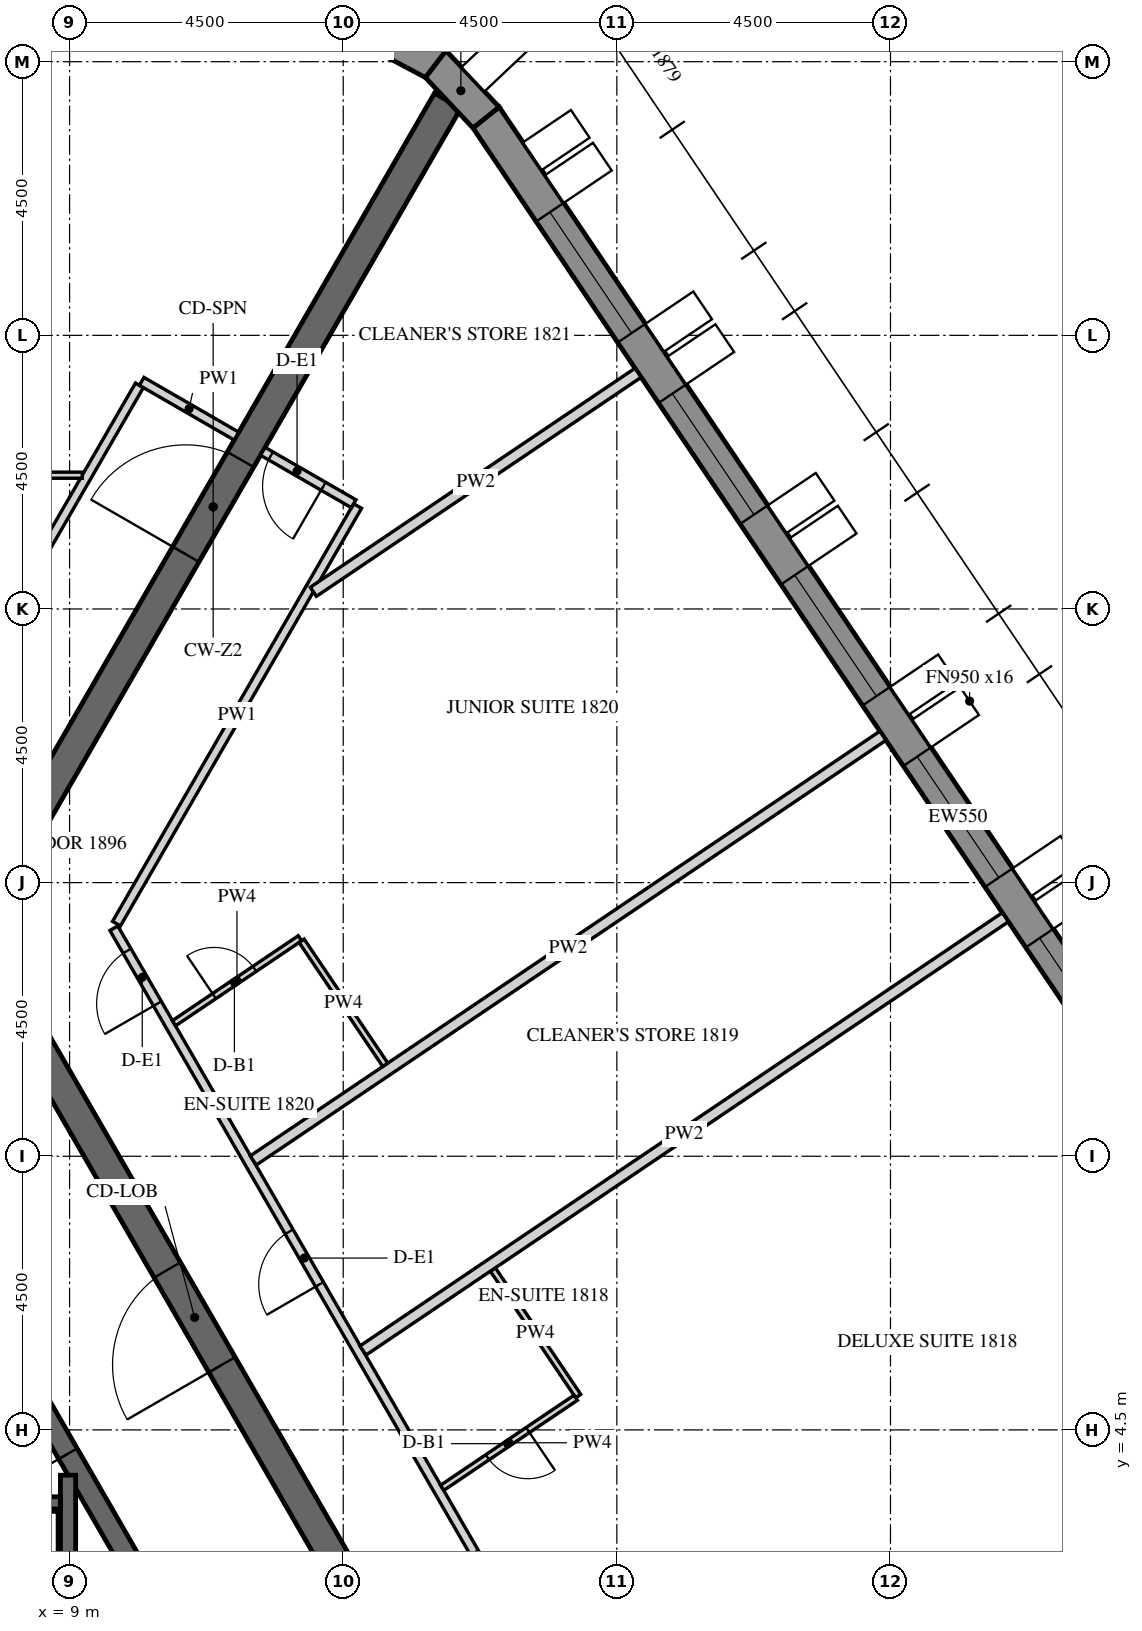
"""IFC4 building model, lengths in metres.
Left out: names, types, materials, properties, quantities, classifications, styles, units other than length and angle.
Written with IfcOpenShell. Run it as: python <this file> out.ifc"""

import sys

from ifc_helpers import new_model, si_unit, direction, frame, frame_2d, origin, place, context, subcontext, project, spatial, polyline, rectangle, outline, extrude, element, fill, save


model = new_model("IFC4")
c1 = context("Model", 3, precision=1e-05, world=origin(), true_north=direction((0.0, 1.0)))
c2 = subcontext(c1, "Body", "Model", "MODEL_VIEW")
j1 = project(units=[si_unit("LENGTHUNIT", "METRE"), si_unit("PLANEANGLEUNIT", "RADIAN")], contexts=[c1])
p1 = place(None, origin())
s1 = spatial("IfcSite", under=j1, at=p1, CompositionType="ELEMENT")
p2 = place(p1, origin())
s2 = spatial("IfcBuilding", under=s1, at=p2, CompositionType="ELEMENT")
p3 = place(p2, frame((0.0, 0.0, 226.8)))
s3 = spatial("IfcBuildingStorey", under=s2, at=p3, CompositionType="ELEMENT", Elevation=226.8)
p4 = place(p3, frame((31.371, 3.071, -0.15), z_axis=(0.0, 0.0, 1.0), x_axis=(-0.559189891278, 0.829039604297, 0.0)))
e1 = element("IfcWall", 1, at=p4, inside=s3, PredefinedType="SOLIDWALL", context=c2, shape_type="SweptSolid", body=[
    extrude(outline(polyline([(-0.026, -0.275), (27.781, -0.275), (27.736, 0.275), (0.026, 0.275), (-0.026, -0.275)])), origin(), (0.0, 0.0, 1.0), 3.9),
])
p5 = place(p4, frame((1.879, 0.0, 1.05)))
e2 = element("IfcOpeningElement", 2, at=p5, cuts=e1, PredefinedType="OPENING", context=c2, shape_type="SweptSolid", body=[
    extrude(rectangle(XDim=2.4, YDim=2.4, at=frame_2d((1.2, 1.2))), frame((0.0, 0.285, 0.0), z_axis=(0.0, -1.0, 0.0), x_axis=(1.0, 0.0, 0.0)), (0.0, 0.0, 1.0), 0.57),
])
p6 = place(p4, frame((5.479, 0.0, 1.05)))
e3 = element("IfcOpeningElement", 3, at=p6, cuts=e1, PredefinedType="OPENING", context=c2, shape_type="SweptSolid", body=[
    extrude(rectangle(XDim=2.4, YDim=2.4, at=frame_2d((1.2, 1.2))), frame((0.0, 0.285, 0.0), z_axis=(0.0, -1.0, 0.0), x_axis=(1.0, 0.0, 0.0)), (0.0, 0.0, 1.0), 0.57),
])
p7 = place(p4, frame((9.079, 0.0, 1.05)))
e4 = element("IfcOpeningElement", 4, at=p7, cuts=e1, PredefinedType="OPENING", context=c2, shape_type="SweptSolid", body=[
    extrude(rectangle(XDim=2.4, YDim=2.4, at=frame_2d((1.2, 1.2))), frame((0.0, 0.285, 0.0), z_axis=(0.0, -1.0, 0.0), x_axis=(1.0, 0.0, 0.0)), (0.0, 0.0, 1.0), 0.57),
])
p8 = place(p4, frame((12.679, 0.0, 1.05)))
e5 = element("IfcOpeningElement", 5, at=p8, cuts=e1, PredefinedType="OPENING", context=c2, shape_type="SweptSolid", body=[
    extrude(rectangle(XDim=2.4, YDim=2.4, at=frame_2d((1.2, 1.2))), frame((0.0, 0.285, 0.0), z_axis=(0.0, -1.0, 0.0), x_axis=(1.0, 0.0, 0.0)), (0.0, 0.0, 1.0), 0.57),
])
p9 = place(p4, frame((16.279, 0.0, 1.05)))
e6 = element("IfcOpeningElement", 6, at=p9, cuts=e1, PredefinedType="OPENING", context=c2, shape_type="SweptSolid", body=[
    extrude(rectangle(XDim=2.4, YDim=2.4, at=frame_2d((1.2, 1.2))), frame((0.0, 0.285, 0.0), z_axis=(0.0, -1.0, 0.0), x_axis=(1.0, 0.0, 0.0)), (0.0, 0.0, 1.0), 0.57),
])
p10 = place(p4, frame((19.879, 0.0, 1.05)))
e7 = element("IfcOpeningElement", 7, at=p10, cuts=e1, PredefinedType="OPENING", context=c2, shape_type="SweptSolid", body=[
    extrude(rectangle(XDim=2.4, YDim=2.4, at=frame_2d((1.2, 1.2))), frame((0.0, 0.285, 0.0), z_axis=(0.0, -1.0, 0.0), x_axis=(1.0, 0.0, 0.0)), (0.0, 0.0, 1.0), 0.57),
])
p11 = place(p4, frame((23.479, 0.0, 1.05)))
e8 = element("IfcOpeningElement", 8, at=p11, cuts=e1, PredefinedType="OPENING", context=c2, shape_type="SweptSolid", body=[
    extrude(rectangle(XDim=2.4, YDim=2.4, at=frame_2d((1.2, 1.2))), frame((0.0, 0.285, 0.0), z_axis=(0.0, -1.0, 0.0), x_axis=(1.0, 0.0, 0.0)), (0.0, 0.0, 1.0), 0.57),
])
p12 = place(p3, frame((15.849, 26.083, -0.15), z_axis=(0.0, 0.0, 1.0), x_axis=(-0.686196220404, 0.727416488061, 0.0)))
e9 = element("IfcWall", 9, at=p12, inside=s3, PredefinedType="SOLIDWALL", context=c2, shape_type="SweptSolid", body=[
    extrude(outline(polyline([(-0.022, -0.275), (1.253, -0.275), (1.163, 0.275), (0.022, 0.275), (-0.022, -0.275)])), origin(), (0.0, 0.0, 1.0), 3.9),
])
p13 = place(p3, frame((15.02, 26.962, -0.15), z_axis=(0.0, 0.0, 1.0), x_axis=(-0.882950818639, 0.469465495926, 0.0)))
e10 = element("IfcWall", 10, at=p13, inside=s3, PredefinedType="SOLIDWALL", context=c2, shape_type="SweptSolid", body=[
    extrude(outline(polyline([(-0.045, -0.275), (1.253, -0.275), (1.163, 0.275), (0.045, 0.275), (-0.045, -0.275)])), origin(), (0.0, 0.0, 1.0), 3.9),
])
p14 = place(p3, frame((14.722, 0.0, -0.15), z_axis=(0.0, 0.0, 1.0), x_axis=(-0.50000571537, 0.866022103989, 0.0)))
e11 = element("IfcWall", 11, at=p14, inside=s3, PredefinedType="SHEAR", context=c2, shape_type="SweptSolid", body=[
    extrude(outline(polyline([(-0.144, -0.25), (14.867, -0.25), (14.578, 0.25), (0.144, 0.25), (-0.144, -0.25)])), origin(), (0.0, 0.0, 1.0), 3.9),
])
p15 = place(p14, frame((6.432, 0.0, 0.15)))
e12 = element("IfcOpeningElement", 12, at=p15, cuts=e11, PredefinedType="OPENING", context=c2, shape_type="SweptSolid", body=[
    extrude(rectangle(XDim=1.8, YDim=2.4, at=frame_2d((0.9, 1.2))), frame((0.0, 0.26, 0.0), z_axis=(0.0, -1.0, 0.0), x_axis=(1.0, 0.0, 0.0)), (0.0, 0.0, 1.0), 0.52),
])
p16 = place(p3, frame((7.506, 13.0, -0.15), z_axis=(0.0, 0.0, 1.0), x_axis=(0.499988271576, 0.866032175087, 0.0)))
e13 = element("IfcWall", 13, at=p16, inside=s3, PredefinedType="SHEAR", context=c2, shape_type="SweptSolid", body=[
    extrude(rectangle(XDim=15.424, YDim=0.5, at=frame_2d((7.712, 0.0))), origin(), (0.0, 0.0, 1.0), 3.9),
])
p17 = place(p16, frame((6.812, 0.0, 0.15)))
e14 = element("IfcOpeningElement", 14, at=p17, cuts=e13, PredefinedType="OPENING", context=c2, shape_type="SweptSolid", body=[
    extrude(rectangle(XDim=1.8, YDim=2.4, at=frame_2d((0.9, 1.2))), frame((0.0, 0.26, 0.0), z_axis=(0.0, -1.0, 0.0), x_axis=(1.0, 0.0, 0.0)), (0.0, 0.0, 1.0), 0.52),
])
p18 = place(p3, frame((11.345, 0.0, -0.15), z_axis=(0.0, 0.0, 1.0), x_axis=(-0.499995046907, 0.866028263435, 0.0)))
e15 = element("IfcWall", 15, at=p18, inside=s3, PredefinedType="SHEAR", context=c2, shape_type="SweptSolid", body=[
    extrude(outline(polyline([(-0.101, -0.175), (11.446, -0.175), (11.244, 0.175), (0.101, 0.175), (-0.101, -0.175)])), origin(), (0.0, 0.0, 1.0), 3.9),
])
p19 = place(p18, frame((4.744, 0.0, 0.15)))
e16 = element("IfcOpeningElement", 16, at=p19, cuts=e15, PredefinedType="OPENING", context=c2, shape_type="SweptSolid", body=[
    extrude(rectangle(XDim=1.8, YDim=2.4, at=frame_2d((0.9, 1.2))), frame((0.0, 0.185, 0.0), z_axis=(0.0, -1.0, 0.0), x_axis=(1.0, 0.0, 0.0)), (0.0, 0.0, 1.0), 0.37),
])
p20 = place(p3, frame((8.975, -3.755, -0.25), z_axis=(0.0, 0.0, 1.0), x_axis=(0.0, 1.0, 0.0)))
e17 = element("IfcWall", 17, at=p20, inside=s3, PredefinedType="SHEAR", context=c2, shape_type="SweptSolid", body=[
    extrude(rectangle(XDim=7.51, YDim=0.25, at=frame_2d((3.755, 0.0))), origin(), (0.0, 0.0, 1.0), 3.9),
])
p21 = place(p3, frame((5.9, 3.3, -0.25), z_axis=(0.0, 0.0, 1.0), x_axis=(1.0, 0.0, 0.0)))
e18 = element("IfcWall", 18, at=p21, inside=s3, PredefinedType="SHEAR", context=c2, shape_type="SweptSolid", body=[
    extrude(rectangle(XDim=2.95, YDim=0.2, at=frame_2d((1.475, 0.0))), origin(), (0.0, 0.0, 1.0), 3.9),
])
p22 = place(p3, frame((10.149, 21.678, 0.0), z_axis=(0.0, 0.0, 1.0), x_axis=(-0.499997422768, -0.866026891745, 0.0)))
e19 = element("IfcWall", 19, at=p22, inside=s3, PredefinedType="PARTITIONING", context=c2, shape_type="SweptSolid", body=[
    extrude(rectangle(XDim=7.942, YDim=0.15, at=frame_2d((3.971, 0.0))), origin(), (0.0, 0.0, 1.0), 2.988),
])
p23 = place(p3, frame((11.745, 20.843, 0.0), z_axis=(0.0, 0.0, 1.0), x_axis=(-0.865989075817, 0.500062916607, 0.0)))
e20 = element("IfcWall", 20, at=p23, inside=s3, PredefinedType="PARTITIONING", context=c2, shape_type="SweptSolid", body=[
    extrude(rectangle(XDim=1.8, YDim=0.15, at=frame_2d((0.9, 0.0))), origin(), (0.0, 0.0, 1.0), 2.988),
])
p24 = place(p3, frame((17.046, 0.075, 0.0), z_axis=(0.0, 0.0, 1.0), x_axis=(-0.499996322767, 0.866027526826, 0.0)))
e21 = element("IfcWall", 21, at=p24, inside=s3, PredefinedType="PARTITIONING", context=c2, shape_type="SweptSolid", body=[
    extrude(rectangle(XDim=14.636, YDim=0.15, at=frame_2d((7.318, 0.0))), origin(), (0.0, 0.0, 1.0), 2.988),
])
p25 = place(p24, frame((1.781, 0.0, 0.0)))
e22 = element("IfcOpeningElement", 22, at=p25, cuts=e21, PredefinedType="OPENING", context=c2, shape_type="SweptSolid", body=[
    extrude(rectangle(XDim=1.0, YDim=2.1, at=frame_2d((0.5, 1.05))), frame((0.0, 0.085, 0.0), z_axis=(0.0, -1.0, 0.0), x_axis=(1.0, 0.0, 0.0)), (0.0, 0.0, 1.0), 0.17),
])
p26 = place(p24, frame((7.872, 0.0, 0.0)))
e23 = element("IfcOpeningElement", 23, at=p26, cuts=e21, PredefinedType="OPENING", context=c2, shape_type="SweptSolid", body=[
    extrude(rectangle(XDim=1.0, YDim=2.1, at=frame_2d((0.5, 1.05))), frame((0.0, 0.085, 0.0), z_axis=(0.0, -1.0, 0.0), x_axis=(1.0, 0.0, 0.0)), (0.0, 0.0, 1.0), 0.17),
])
p27 = place(p24, frame((13.203, 0.0, 0.0)))
e24 = element("IfcOpeningElement", 24, at=p27, cuts=e21, PredefinedType="OPENING", context=c2, shape_type="SweptSolid", body=[
    extrude(rectangle(XDim=1.0, YDim=2.1, at=frame_2d((0.5, 1.05))), frame((0.0, 0.085, 0.0), z_axis=(0.0, -1.0, 0.0), x_axis=(1.0, 0.0, 0.0)), (0.0, 0.0, 1.0), 0.17),
])
p28 = place(p3, frame((9.772, 12.825, 0.0), z_axis=(0.0, 0.0, 1.0), x_axis=(0.499989830942, 0.866031274813, 0.0)))
e25 = element("IfcWall", 25, at=p28, inside=s3, PredefinedType="PARTITIONING", context=c2, shape_type="SweptSolid", body=[
    extrude(rectangle(XDim=7.93, YDim=0.15, at=frame_2d((3.965, 0.0))), origin(), (0.0, 0.0, 1.0), 2.988),
])
p29 = place(p3, frame((13.672, 19.73, 0.0), z_axis=(0.0, 0.0, 1.0), x_axis=(-0.866074815912, 0.499914405916, 0.0)))
e26 = element("IfcWall", 26, at=p29, inside=s3, PredefinedType="PARTITIONING", context=c2, shape_type="SweptSolid", body=[
    extrude(rectangle(XDim=1.725, YDim=0.15, at=frame_2d((0.862, 0.0))), origin(), (0.0, 0.0, 1.0), 2.988),
])
p30 = place(p29, frame((0.575, 0.0, 0.0)))
e27 = element("IfcOpeningElement", 27, at=p30, cuts=e26, PredefinedType="OPENING", context=c2, shape_type="SweptSolid", body=[
    extrude(rectangle(XDim=1.0, YDim=2.1, at=frame_2d((0.5, 1.05))), frame((0.0, 0.085, 0.0), z_axis=(0.0, -1.0, 0.0), x_axis=(1.0, 0.0, 0.0)), (0.0, 0.0, 1.0), 0.17),
])
p31 = place(p3, frame((9.209, 20.2, 0.0), z_axis=(0.0, 0.0, 1.0), x_axis=(-1.0, 0.0, 0.0)))
e28 = element("IfcWall", 28, at=p31, inside=s3, PredefinedType="PARTITIONING", context=c2, shape_type="SweptSolid", body=[
    extrude(rectangle(XDim=8.527, YDim=0.1, at=frame_2d((4.263, 0.0))), origin(), (0.0, 0.0, 1.0), 2.988),
])
p32 = place(p31, frame((2.677, 0.0, 0.0)))
e29 = element("IfcOpeningElement", 29, at=p32, cuts=e28, PredefinedType="OPENING", context=c2, shape_type="SweptSolid", body=[
    extrude(rectangle(XDim=0.9, YDim=2.1, at=frame_2d((0.45, 1.05))), frame((0.0, 0.06, 0.0), z_axis=(0.0, -1.0, 0.0), x_axis=(1.0, 0.0, 0.0)), (0.0, 0.0, 1.0), 0.12),
])
p33 = place(p3, frame((15.961, 7.138, 0.0), z_axis=(0.0, 0.0, 1.0), x_axis=(0.559158770347, -0.829060594615, 0.0)))
e30 = element("IfcWall", 30, at=p33, inside=s3, PredefinedType="PARTITIONING", context=c2, shape_type="SweptSolid", body=[
    extrude(rectangle(XDim=2.51, YDim=0.1, at=frame_2d((1.255, 0.0))), origin(), (0.0, 0.0, 1.0), 2.988),
])
p34 = place(p3, frame((17.323, 5.029, 0.0), z_axis=(0.0, 0.0, 1.0), x_axis=(-0.829031379595, -0.559202084802, 0.0)))
e31 = element("IfcWall", 31, at=p34, inside=s3, PredefinedType="PARTITIONING", context=c2, shape_type="SweptSolid", body=[
    extrude(rectangle(XDim=2.648, YDim=0.1, at=frame_2d((1.324, 0.0))), origin(), (0.0, 0.0, 1.0), 2.988),
])
p35 = place(p34, frame((0.95, 0.0, 0.0)))
e32 = element("IfcOpeningElement", 32, at=p35, cuts=e31, PredefinedType="OPENING", context=c2, shape_type="SweptSolid", body=[
    extrude(rectangle(XDim=0.8, YDim=2.1, at=frame_2d((0.4, 1.05))), frame((0.0, 0.06, 0.0), z_axis=(0.0, -1.0, 0.0), x_axis=(1.0, 0.0, 0.0)), (0.0, 0.0, 1.0), 0.12),
])
p36 = place(p3, frame((24.389, 12.931, 0.0), z_axis=(0.0, 0.0, 1.0), x_axis=(-0.829037426209, -0.559193120438, 0.0)))
e33 = element("IfcWall", 33, at=p36, inside=s3, PredefinedType="PARTITIONING", context=c2, shape_type="SweptSolid", body=[
    extrude(rectangle(XDim=12.742, YDim=0.18, at=frame_2d((6.371, 0.0))), origin(), (0.0, 0.0, 1.0), 2.988),
])
p37 = place(p3, frame((22.376, 15.915, 0.0), z_axis=(0.0, 0.0, 1.0), x_axis=(-0.829037148953, -0.559193531487, 0.0)))
e34 = element("IfcWall", 34, at=p37, inside=s3, PredefinedType="PARTITIONING", context=c2, shape_type="SweptSolid", body=[
    extrude(rectangle(XDim=12.491, YDim=0.18, at=frame_2d((6.246, 0.0))), origin(), (0.0, 0.0, 1.0), 2.988),
])
p38 = place(p3, frame((10.717, 11.188, 0.0), z_axis=(0.0, 0.0, 1.0), x_axis=(0.829016292589, 0.559224451024, 0.0)))
e35 = element("IfcWall", 35, at=p38, inside=s3, PredefinedType="PARTITIONING", context=c2, shape_type="SweptSolid", body=[
    extrude(rectangle(XDim=2.499, YDim=0.1, at=frame_2d((1.249, 0.0))), origin(), (0.0, 0.0, 1.0), 2.988),
])
p39 = place(p38, frame((0.799, 0.0, 0.0)))
e36 = element("IfcOpeningElement", 36, at=p39, cuts=e35, PredefinedType="OPENING", context=c2, shape_type="SweptSolid", body=[
    extrude(rectangle(XDim=0.8, YDim=2.1, at=frame_2d((0.4, 1.05))), frame((0.0, 0.06, 0.0), z_axis=(0.0, -1.0, 0.0), x_axis=(1.0, 0.0, 0.0)), (0.0, 0.0, 1.0), 0.12),
])
p40 = place(p3, frame((12.816, 12.543, 0.0), z_axis=(0.0, 0.0, 1.0), x_axis=(0.559181331227, -0.829045378015, 0.0)))
e37 = element("IfcWall", 37, at=p40, inside=s3, PredefinedType="PARTITIONING", context=c2, shape_type="SweptSolid", body=[
    extrude(rectangle(XDim=2.46, YDim=0.1, at=frame_2d((1.23, 0.0))), origin(), (0.0, 0.0, 1.0), 2.988),
])
p41 = place(p3, frame((18.35, 21.884, 0.0), z_axis=(0.0, 0.0, 1.0), x_axis=(-0.829047205772, -0.559178621374, 0.0)))
e38 = element("IfcWall", 38, at=p41, inside=s3, PredefinedType="PARTITIONING", context=c2, shape_type="SweptSolid", body=[
    extrude(rectangle(XDim=6.442, YDim=0.18, at=frame_2d((3.221, 0.0))), origin(), (0.0, 0.0, 1.0), 2.988),
])
p42 = place(p7, frame((0.0, 0.205, 0.0)))
e39 = element("IfcWindow", 39, at=p42, inside=s3, PartitioningType="DOUBLE_PANEL_VERTICAL", PredefinedType="WINDOW", context=c2, shape_type="SweptSolid", body=[
    extrude(rectangle(XDim=2.4, YDim=2.4, at=frame_2d((1.2, 1.2))), frame((0.0, 0.03, 0.0), z_axis=(0.0, -1.0, 0.0), x_axis=(1.0, 0.0, 0.0)), (0.0, 0.0, 1.0), 0.06),
])
fill(e4, e39)
p43 = place(p8, frame((0.0, 0.205, 0.0)))
e40 = element("IfcWindow", 40, at=p43, inside=s3, PartitioningType="DOUBLE_PANEL_VERTICAL", PredefinedType="WINDOW", context=c2, shape_type="SweptSolid", body=[
    extrude(rectangle(XDim=2.4, YDim=2.4, at=frame_2d((1.2, 1.2))), frame((0.0, 0.03, 0.0), z_axis=(0.0, -1.0, 0.0), x_axis=(1.0, 0.0, 0.0)), (0.0, 0.0, 1.0), 0.06),
])
fill(e5, e40)
p44 = place(p9, frame((0.0, 0.205, 0.0)))
e41 = element("IfcWindow", 41, at=p44, inside=s3, PartitioningType="DOUBLE_PANEL_VERTICAL", PredefinedType="WINDOW", context=c2, shape_type="SweptSolid", body=[
    extrude(rectangle(XDim=2.4, YDim=2.4, at=frame_2d((1.2, 1.2))), frame((0.0, 0.03, 0.0), z_axis=(0.0, -1.0, 0.0), x_axis=(1.0, 0.0, 0.0)), (0.0, 0.0, 1.0), 0.06),
])
fill(e6, e41)
p45 = place(p10, frame((0.0, 0.205, 0.0)))
e42 = element("IfcWindow", 42, at=p45, inside=s3, PartitioningType="DOUBLE_PANEL_VERTICAL", PredefinedType="WINDOW", context=c2, shape_type="SweptSolid", body=[
    extrude(rectangle(XDim=2.4, YDim=2.4, at=frame_2d((1.2, 1.2))), frame((0.0, 0.03, 0.0), z_axis=(0.0, -1.0, 0.0), x_axis=(1.0, 0.0, 0.0)), (0.0, 0.0, 1.0), 0.06),
])
fill(e7, e42)
p46 = place(p11, frame((0.0, 0.205, 0.0)))
e43 = element("IfcWindow", 43, at=p46, inside=s3, PartitioningType="DOUBLE_PANEL_VERTICAL", PredefinedType="WINDOW", context=c2, shape_type="SweptSolid", body=[
    extrude(rectangle(XDim=2.4, YDim=2.4, at=frame_2d((1.2, 1.2))), frame((0.0, 0.03, 0.0), z_axis=(0.0, -1.0, 0.0), x_axis=(1.0, 0.0, 0.0)), (0.0, 0.0, 1.0), 0.06),
])
fill(e8, e43)
p47 = place(p15, origin())
e44 = element("IfcDoor", 44, at=p47, inside=s3, OperationType="DOUBLE_DOOR_SINGLE_SWING", PredefinedType="DOOR", context=c2, shape_type="SweptSolid", body=[
    extrude(rectangle(XDim=1.8, YDim=2.4, at=frame_2d((0.9, 1.2))), frame((0.0, 0.025, 0.0), z_axis=(0.0, -1.0, 0.0), x_axis=(1.0, 0.0, 0.0)), (0.0, 0.0, 1.0), 0.05),
])
fill(e12, e44)
p48 = place(p17, origin())
e45 = element("IfcDoor", 45, at=p48, inside=s3, OperationType="DOUBLE_DOOR_SINGLE_SWING", PredefinedType="DOOR", context=c2, shape_type="SweptSolid", body=[
    extrude(rectangle(XDim=1.8, YDim=2.4, at=frame_2d((0.9, 1.2))), frame((0.0, 0.025, 0.0), z_axis=(0.0, -1.0, 0.0), x_axis=(1.0, 0.0, 0.0)), (0.0, 0.0, 1.0), 0.05),
])
fill(e14, e45)
p49 = place(p19, origin())
e46 = element("IfcDoor", 46, at=p49, inside=s3, OperationType="DOUBLE_DOOR_SINGLE_SWING", PredefinedType="DOOR", context=c2, shape_type="SweptSolid", body=[
    extrude(rectangle(XDim=1.8, YDim=2.4, at=frame_2d((0.9, 1.2))), frame((0.0, 0.025, 0.0), z_axis=(0.0, -1.0, 0.0), x_axis=(1.0, 0.0, 0.0)), (0.0, 0.0, 1.0), 0.05),
])
fill(e16, e46)
p50 = place(p35, origin())
e47 = element("IfcDoor", 47, at=p50, inside=s3, OperationType="SINGLE_SWING_LEFT", PredefinedType="DOOR", context=c2, shape_type="SweptSolid", body=[
    extrude(rectangle(XDim=0.8, YDim=2.1, at=frame_2d((0.4, 1.05))), frame((0.0, 0.025, 0.0), z_axis=(0.0, -1.0, 0.0), x_axis=(1.0, 0.0, 0.0)), (0.0, 0.0, 1.0), 0.05),
])
fill(e32, e47)
p51 = place(p26, origin())
e48 = element("IfcDoor", 48, at=p51, inside=s3, OperationType="SINGLE_SWING_RIGHT", PredefinedType="DOOR", context=c2, shape_type="SweptSolid", body=[
    extrude(rectangle(XDim=1.0, YDim=2.1, at=frame_2d((0.5, 1.05))), frame((0.0, 0.025, 0.0), z_axis=(0.0, -1.0, 0.0), x_axis=(1.0, 0.0, 0.0)), (0.0, 0.0, 1.0), 0.05),
])
fill(e23, e48)
p52 = place(p27, origin())
e49 = element("IfcDoor", 49, at=p52, inside=s3, OperationType="SINGLE_SWING_LEFT", PredefinedType="DOOR", context=c2, shape_type="SweptSolid", body=[
    extrude(rectangle(XDim=1.0, YDim=2.1, at=frame_2d((0.5, 1.05))), frame((0.0, 0.025, 0.0), z_axis=(0.0, -1.0, 0.0), x_axis=(1.0, 0.0, 0.0)), (0.0, 0.0, 1.0), 0.05),
])
fill(e24, e49)
p53 = place(p39, origin())
e50 = element("IfcDoor", 50, at=p53, inside=s3, OperationType="SINGLE_SWING_RIGHT", PredefinedType="DOOR", context=c2, shape_type="SweptSolid", body=[
    extrude(rectangle(XDim=0.8, YDim=2.1, at=frame_2d((0.4, 1.05))), frame((0.0, 0.025, 0.0), z_axis=(0.0, -1.0, 0.0), x_axis=(1.0, 0.0, 0.0)), (0.0, 0.0, 1.0), 0.05),
])
fill(e36, e50)
p54 = place(p30, origin())
e51 = element("IfcDoor", 51, at=p54, inside=s3, OperationType="SINGLE_SWING_LEFT", PredefinedType="DOOR", context=c2, shape_type="SweptSolid", body=[
    extrude(rectangle(XDim=1.0, YDim=2.1, at=frame_2d((0.5, 1.05))), frame((0.0, 0.025, 0.0), z_axis=(0.0, -1.0, 0.0), x_axis=(1.0, 0.0, 0.0)), (0.0, 0.0, 1.0), 0.05),
])
fill(e27, e51)
save(model, sys.argv[1])
